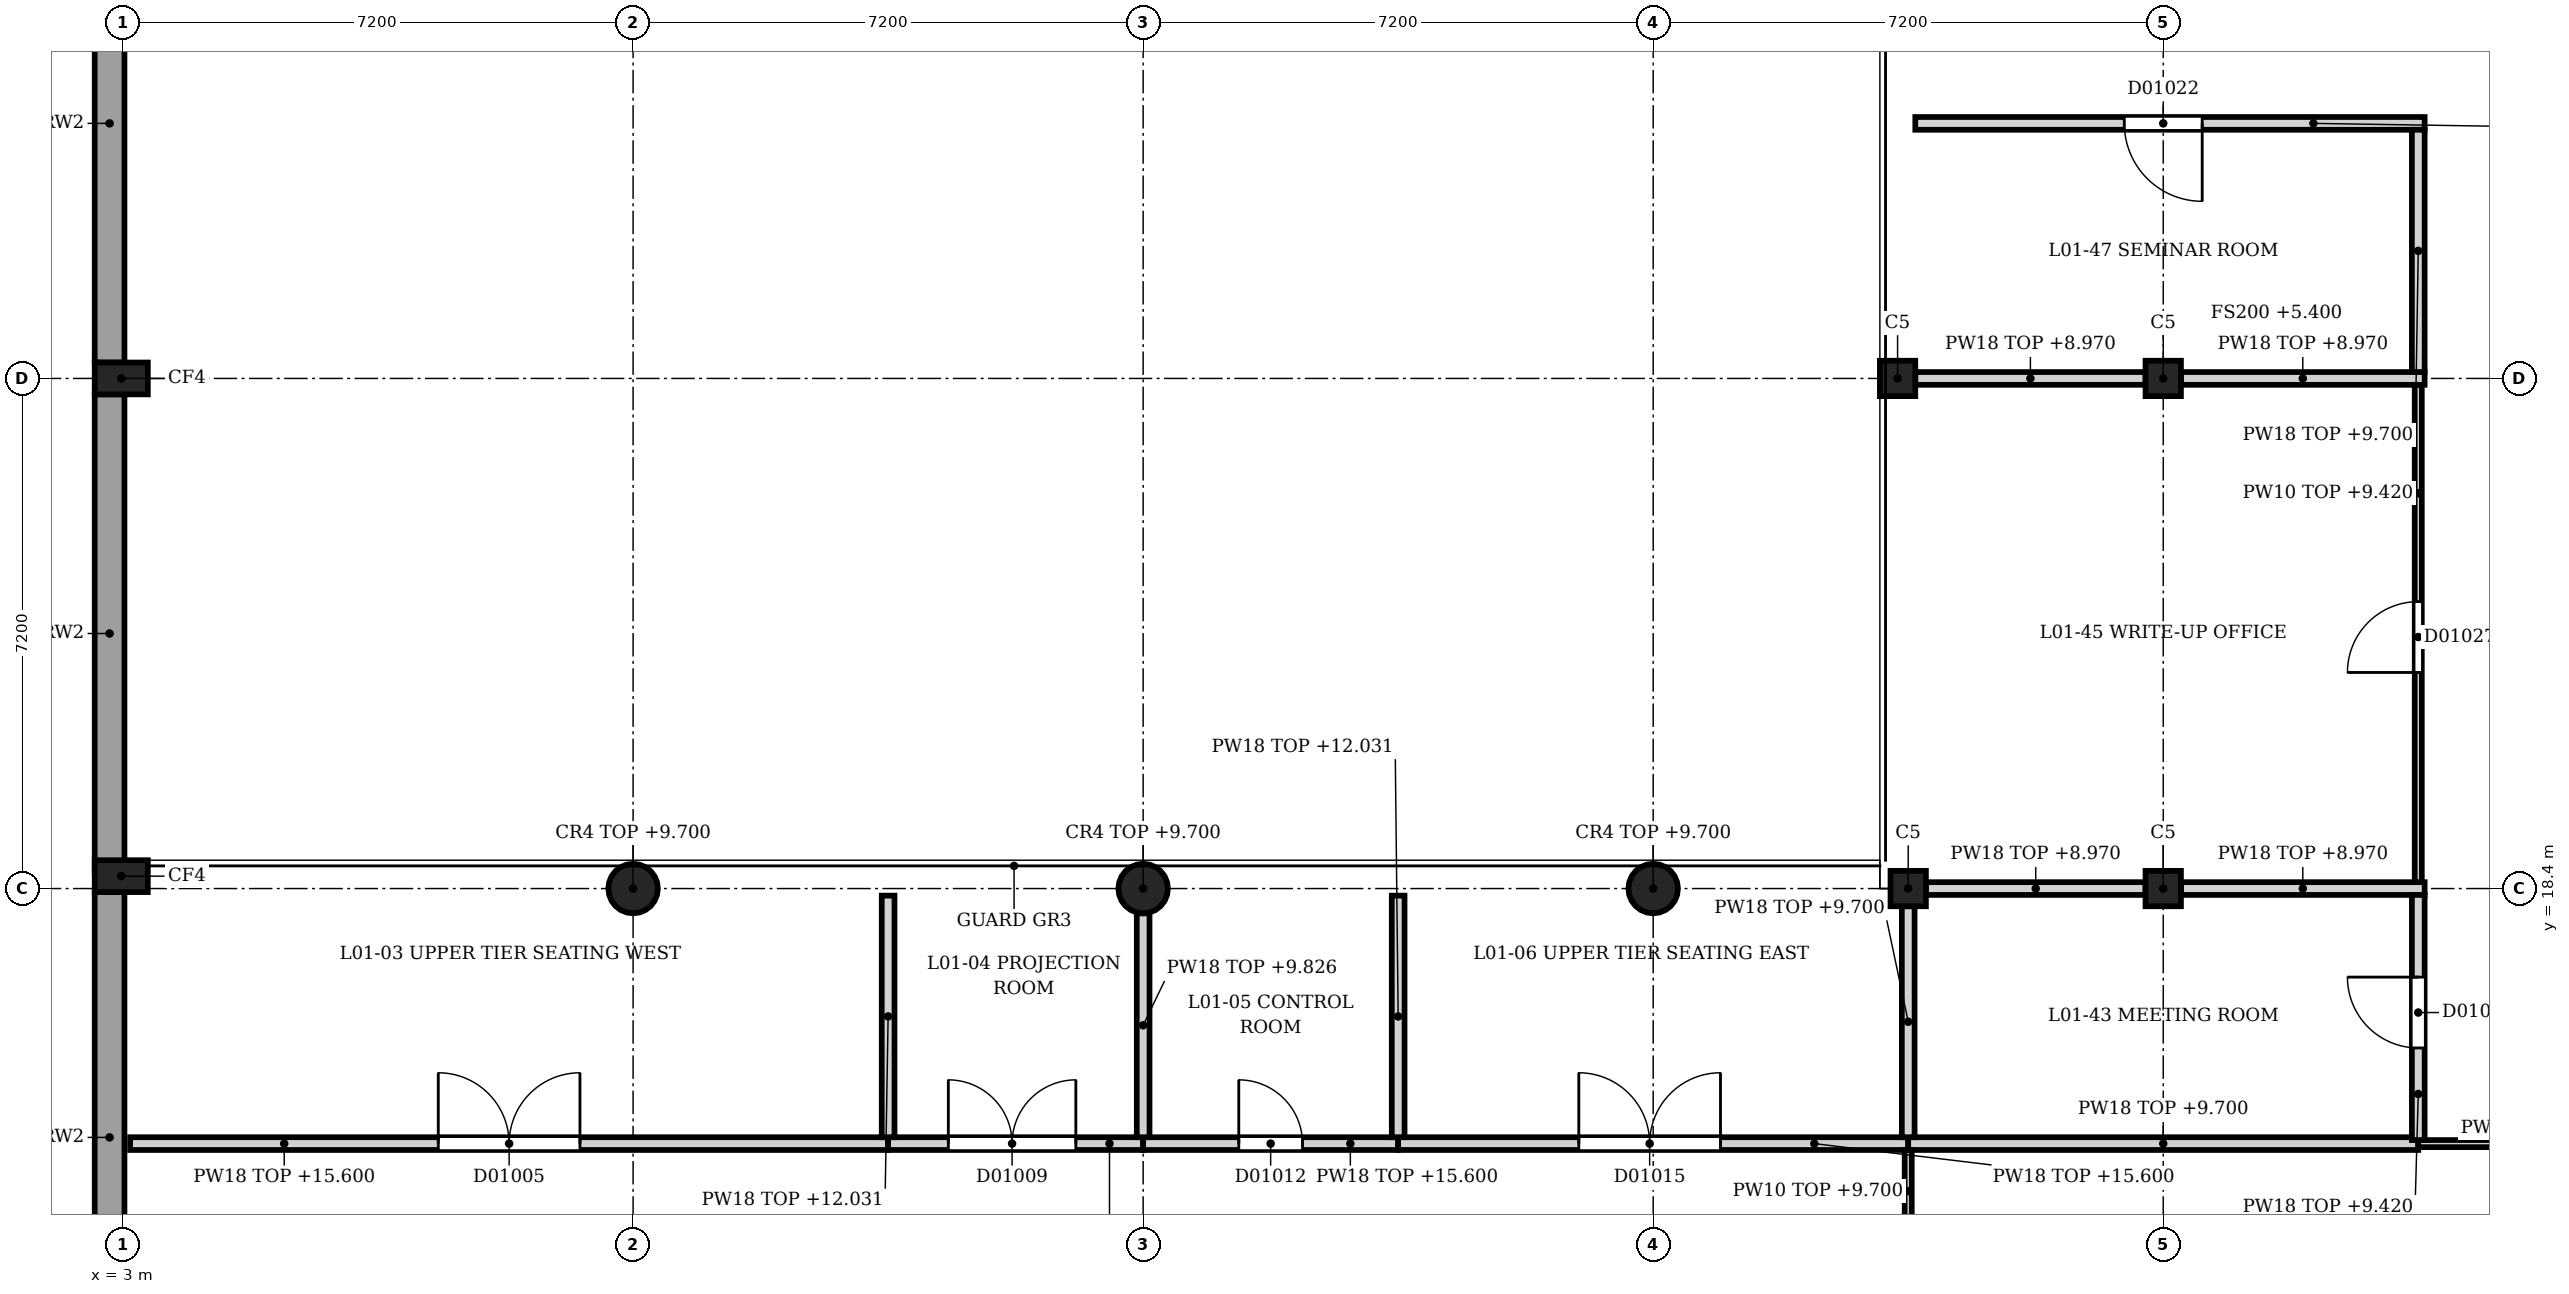
"""IFC4 building model, lengths in metres.
Left out: names, types, materials, properties, quantities, classifications, styles, units other than length and angle.
Written with IfcOpenShell. Run it as: python <this file> out.ifc"""

import sys

from ifc_helpers import new_model, si_unit, direction, frame, frame_2d, origin, origin_2d, place, context, subcontext, project, spatial, rectangle, circle, extrude, element, fill, save


model = new_model("IFC4")
c1 = context("Model", 3, precision=1e-05, world=origin(), true_north=direction((0.0, 1.0)))
c2 = subcontext(c1, "Body", "Model", "MODEL_VIEW")
j1 = project(units=[si_unit("LENGTHUNIT", "METRE"), si_unit("PLANEANGLEUNIT", "RADIAN")], contexts=[c1])
p1 = place(None, origin())
s1 = spatial("IfcSite", under=j1, at=p1, CompositionType="ELEMENT")
p2 = place(p1, origin())
s2 = spatial("IfcBuilding", under=s1, at=p2, CompositionType="ELEMENT")
p3 = place(p2, frame((0.0, 0.0, 5.4)))
s3 = spatial("IfcBuildingStorey", under=s2, at=p3, CompositionType="ELEMENT", Elevation=5.4)
for number, where, z_axis, x_axis in (
    (1, (28.2, 18.4, 0.0), (0.0, 0.0, 1.0), (1.0, 0.0, 0.0)),
    (2, (28.05, 25.6, 0.0), (0.0, 0.0, 1.0), (1.0, 0.0, 0.0)),
    (3, (31.8, 18.4, 0.0), (0.0, 0.0, 1.0), (1.0, 0.0, 0.0)),
    (4, (31.8, 25.6, 0.0), (0.0, 0.0, 1.0), (1.0, 0.0, 0.0)),
):
    element("IfcColumn", number, at=place(p3, frame(where, z_axis=z_axis, x_axis=x_axis)), inside=s3, PredefinedType="COLUMN", context=c2, shape_type="SweptSolid", body=[
        extrude(rectangle(XDim=0.5, YDim=0.5, at=origin_2d()), origin(), (0.0, 0.0, 1.0), 4.5),
    ])
p4 = place(p3, frame((2.975, 18.575, 0.0), z_axis=(0.0, 0.0, 1.0), x_axis=(1.0, 0.0, 0.0)))
e5 = element("IfcColumn", 5, at=p4, inside=s3, PredefinedType="COLUMN", context=c2, shape_type="SweptSolid", body=[
    extrude(rectangle(XDim=0.75, YDim=0.45, at=origin_2d()), origin(), (0.0, 0.0, 1.0), 4.5),
])
for number, where, z_axis, x_axis in (
    (6, (10.2, 18.4, 0.0), (0.0, 0.0, 1.0), (1.0, 0.0, 0.0)),
    (7, (17.4, 18.4, 0.0), (0.0, 0.0, 1.0), (1.0, 0.0, 0.0)),
    (8, (24.6, 18.4, 0.0), (0.0, 0.0, 1.0), (1.0, 0.0, 0.0)),
):
    element("IfcColumn", number, at=place(p3, frame(where, z_axis=z_axis, x_axis=x_axis)), inside=s3, PredefinedType="COLUMN", context=c2, shape_type="SweptSolid", body=[
        extrude(circle(Radius=0.35, at=origin_2d()), origin(), (0.0, 0.0, 1.0), 4.3),
    ])
p5 = place(p3, frame((2.975, 25.6, 0.0), z_axis=(0.0, 0.0, 1.0), x_axis=(1.0, 0.0, 0.0)))
e9 = element("IfcColumn", 9, at=p5, inside=s3, PredefinedType="COLUMN", context=c2, shape_type="SweptSolid", body=[
    extrude(rectangle(XDim=0.75, YDim=0.45, at=origin_2d()), origin(), (0.0, 0.0, 1.0), 4.5),
])
p6 = place(p3, frame((2.81, 11.425, 0.0), z_axis=(0.0, 0.0, 1.0), x_axis=(0.0, 1.0, 0.0)))
e10 = element("IfcWall", 10, at=p6, inside=s3, PredefinedType="SOLIDWALL", context=c2, shape_type="SweptSolid", body=[
    extrude(rectangle(XDim=6.925, YDim=0.42, at=frame_2d((3.462, 0.0))), origin(), (0.0, 0.0, 1.0), 4.5),
])
for number, where, z_axis, x_axis in (
    (11, (2.81, 18.625, 0.0), (0.0, 0.0, 1.0), (0.0, 1.0, 0.0)),
    (12, (2.81, 25.825, 0.0), (0.0, 0.0, 1.0), (0.0, 1.0, 0.0)),
):
    element("IfcWall", number, at=place(p3, frame(where, z_axis=z_axis, x_axis=x_axis)), inside=s3, PredefinedType="SOLIDWALL", context=c2, shape_type="SweptSolid", body=[
        extrude(rectangle(XDim=6.75, YDim=0.42, at=frame_2d((3.375, 0.0))), origin(), (0.0, 0.0, 1.0), 4.5),
    ])
p7 = place(p3, frame((13.8, 14.8, 0.0), z_axis=(0.0, 0.0, 1.0), x_axis=(-1.0, 0.0, 0.0)))
e13 = element("IfcWall", 13, at=p7, inside=s3, PredefinedType="PARTITIONING", context=c2, shape_type="SweptSolid", body=[
    extrude(rectangle(XDim=10.7, YDim=0.18, at=frame_2d((5.35, 0.0))), origin(), (0.0, 0.0, 1.0), 10.2),
])
p8 = place(p7, frame((4.35, 0.0, 0.0)))
e14 = element("IfcOpeningElement", 14, at=p8, cuts=e13, PredefinedType="OPENING", context=c2, shape_type="SweptSolid", body=[
    extrude(rectangle(XDim=2.0, YDim=2.3, at=frame_2d((1.0, 1.15))), frame((0.0, 0.1, 0.0), z_axis=(0.0, -1.0, 0.0), x_axis=(1.0, 0.0, 0.0)), (0.0, 0.0, 1.0), 0.2),
])
p9 = place(p3, frame((13.8, 14.8, 0.0), z_axis=(0.0, 0.0, 1.0), x_axis=(1.0, 0.0, 0.0)))
e15 = element("IfcWall", 15, at=p9, inside=s3, PredefinedType="PARTITIONING", context=c2, shape_type="SweptSolid", body=[
    extrude(rectangle(XDim=3.6, YDim=0.18, at=frame_2d((1.8, 0.0))), origin(), (0.0, 0.0, 1.0), 10.2),
])
p10 = place(p9, frame((0.85, 0.0, 0.0)))
e16 = element("IfcOpeningElement", 16, at=p10, cuts=e15, PredefinedType="OPENING", context=c2, shape_type="SweptSolid", body=[
    extrude(rectangle(XDim=1.8, YDim=2.2, at=frame_2d((0.9, 1.1))), frame((0.0, 0.1, 0.0), z_axis=(0.0, -1.0, 0.0), x_axis=(1.0, 0.0, 0.0)), (0.0, 0.0, 1.0), 0.2),
])
p11 = place(p3, frame((17.4, 14.8, 0.0), z_axis=(0.0, 0.0, 1.0), x_axis=(1.0, 0.0, 0.0)))
e17 = element("IfcWall", 17, at=p11, inside=s3, PredefinedType="PARTITIONING", context=c2, shape_type="SweptSolid", body=[
    extrude(rectangle(XDim=3.6, YDim=0.18, at=frame_2d((1.8, 0.0))), origin(), (0.0, 0.0, 1.0), 10.2),
])
p12 = place(p11, frame((1.35, 0.0, 0.0)))
e18 = element("IfcOpeningElement", 18, at=p12, cuts=e17, PredefinedType="OPENING", context=c2, shape_type="SweptSolid", body=[
    extrude(rectangle(XDim=0.9, YDim=2.2, at=frame_2d((0.45, 1.1))), frame((0.0, 0.1, 0.0), z_axis=(0.0, -1.0, 0.0), x_axis=(1.0, 0.0, 0.0)), (0.0, 0.0, 1.0), 0.2),
])
p13 = place(p3, frame((28.2, 14.8, 0.0), z_axis=(0.0, 0.0, 1.0), x_axis=(-1.0, 0.0, 0.0)))
e19 = element("IfcWall", 19, at=p13, inside=s3, PredefinedType="PARTITIONING", context=c2, shape_type="SweptSolid", body=[
    extrude(rectangle(XDim=7.2, YDim=0.18, at=frame_2d((3.6, 0.0))), origin(), (0.0, 0.0, 1.0), 10.2),
])
p14 = place(p13, frame((2.65, 0.0, 0.0)))
e20 = element("IfcOpeningElement", 20, at=p14, cuts=e19, PredefinedType="OPENING", context=c2, shape_type="SweptSolid", body=[
    extrude(rectangle(XDim=2.0, YDim=2.3, at=frame_2d((1.0, 1.15))), frame((0.0, 0.1, 0.0), z_axis=(0.0, -1.0, 0.0), x_axis=(1.0, 0.0, 0.0)), (0.0, 0.0, 1.0), 0.2),
])
p15 = place(p3, frame((28.2, 14.8, 0.0), z_axis=(0.0, 0.0, 1.0), x_axis=(1.0, 0.0, 0.0)))
e21 = element("IfcWall", 21, at=p15, inside=s3, PredefinedType="PARTITIONING", context=c2, shape_type="SweptSolid", body=[
    extrude(rectangle(XDim=7.2, YDim=0.18, at=frame_2d((3.6, 0.0))), origin(), (0.0, 0.0, 1.0), 4.3),
])
p16 = place(p3, frame((35.4, 14.8, 0.0), z_axis=(0.0, 0.0, 1.0), x_axis=(1.0, 0.0, 0.0)))
e22 = element("IfcWall", 22, at=p16, inside=s3, PredefinedType="PARTITIONING", context=c2, shape_type="SweptSolid", body=[
    extrude(rectangle(XDim=3.6, YDim=0.1, at=frame_2d((1.8, 0.0))), origin(), (0.0, 0.0, 1.0), 4.3),
])
p17 = place(p3, frame((28.45, 18.4, 0.0), z_axis=(0.0, 0.0, 1.0), x_axis=(1.0, 0.0, 0.0)))
e23 = element("IfcWall", 23, at=p17, inside=s3, PredefinedType="PARTITIONING", context=c2, shape_type="SweptSolid", body=[
    extrude(rectangle(XDim=3.1, YDim=0.18, at=frame_2d((1.55, 0.0))), origin(), (0.0, 0.0, 1.0), 3.57),
])
p18 = place(p3, frame((32.05, 18.4, 0.0), z_axis=(0.0, 0.0, 1.0), x_axis=(1.0, 0.0, 0.0)))
e24 = element("IfcWall", 24, at=p18, inside=s3, PredefinedType="PARTITIONING", context=c2, shape_type="SweptSolid", body=[
    extrude(rectangle(XDim=3.44, YDim=0.18, at=frame_2d((1.72, 0.0))), origin(), (0.0, 0.0, 1.0), 3.57),
])
p19 = place(p3, frame((28.3, 25.6, 0.0), z_axis=(0.0, 0.0, 1.0), x_axis=(1.0, 0.0, 0.0)))
e25 = element("IfcWall", 25, at=p19, inside=s3, PredefinedType="PARTITIONING", context=c2, shape_type="SweptSolid", body=[
    extrude(rectangle(XDim=3.25, YDim=0.18, at=frame_2d((1.625, 0.0))), origin(), (0.0, 0.0, 1.0), 3.57),
])
p20 = place(p3, frame((32.05, 25.6, 0.0), z_axis=(0.0, 0.0, 1.0), x_axis=(1.0, 0.0, 0.0)))
e26 = element("IfcWall", 26, at=p20, inside=s3, PredefinedType="PARTITIONING", context=c2, shape_type="SweptSolid", body=[
    extrude(rectangle(XDim=3.44, YDim=0.18, at=frame_2d((1.72, 0.0))), origin(), (0.0, 0.0, 1.0), 3.57),
])
p21 = place(p3, frame((35.49, 29.2, 0.0), z_axis=(0.0, 0.0, 1.0), x_axis=(-1.0, 0.0, 0.0)))
e27 = element("IfcWall", 27, at=p21, inside=s3, PredefinedType="PARTITIONING", context=c2, shape_type="SweptSolid", body=[
    extrude(rectangle(XDim=7.19, YDim=0.18, at=frame_2d((3.595, 0.0))), origin(), (0.0, 0.0, 1.0), 4.3),
])
p22 = place(p21, frame((3.14, 0.0, 0.0)))
e28 = element("IfcOpeningElement", 28, at=p22, cuts=e27, PredefinedType="OPENING", context=c2, shape_type="SweptSolid", body=[
    extrude(rectangle(XDim=1.1, YDim=2.3, at=frame_2d((0.55, 1.15))), frame((0.0, 0.1, 0.0), z_axis=(0.0, -1.0, 0.0), x_axis=(1.0, 0.0, 0.0)), (0.0, 0.0, 1.0), 0.2),
])
p23 = place(p3, frame((13.8, 14.89, 0.0), z_axis=(0.0, 0.0, 1.0), x_axis=(0.0, 1.0, 0.0)))
e29 = element("IfcWall", 29, at=p23, inside=s3, PredefinedType="PARTITIONING", context=c2, shape_type="SweptSolid", body=[
    extrude(rectangle(XDim=3.41, YDim=0.18, at=frame_2d((1.705, 0.0))), origin(), (0.0, 0.0, 1.0), 6.631),
])
p24 = place(p3, frame((17.4, 14.89, 0.0), z_axis=(0.0, 0.0, 1.0), x_axis=(0.0, 1.0, 0.0)))
e30 = element("IfcWall", 30, at=p24, inside=s3, PredefinedType="PARTITIONING", context=c2, shape_type="SweptSolid", body=[
    extrude(rectangle(XDim=3.16, YDim=0.18, at=frame_2d((1.58, 0.0))), origin(), (0.0, 0.0, 1.0), 4.426),
])
p25 = place(p3, frame((21.0, 14.89, 0.0), z_axis=(0.0, 0.0, 1.0), x_axis=(0.0, 1.0, 0.0)))
e31 = element("IfcWall", 31, at=p25, inside=s3, PredefinedType="PARTITIONING", context=c2, shape_type="SweptSolid", body=[
    extrude(rectangle(XDim=3.41, YDim=0.18, at=frame_2d((1.705, 0.0))), origin(), (0.0, 0.0, 1.0), 6.631),
])
p26 = place(p3, frame((28.2, 14.71, 0.0), z_axis=(0.0, 0.0, 1.0), x_axis=(0.0, -1.0, 0.0)))
e32 = element("IfcWall", 32, at=p26, inside=s3, PredefinedType="PARTITIONING", context=c2, shape_type="SweptSolid", body=[
    extrude(rectangle(XDim=3.26, YDim=0.1, at=frame_2d((1.63, 0.0))), origin(), (0.0, 0.0, 1.0), 4.3),
])
p27 = place(p26, frame((1.16, 0.0, 0.0)))
e33 = element("IfcOpeningElement", 33, at=p27, cuts=e32, PredefinedType="OPENING", context=c2, shape_type="SweptSolid", body=[
    extrude(rectangle(XDim=1.0, YDim=2.1, at=frame_2d((0.5, 1.05))), frame((0.0, 0.06, 0.0), z_axis=(0.0, -1.0, 0.0), x_axis=(1.0, 0.0, 0.0)), (0.0, 0.0, 1.0), 0.12),
])
p28 = place(p3, frame((28.2, 14.89, 0.0), z_axis=(0.0, 0.0, 1.0), x_axis=(0.0, 1.0, 0.0)))
e34 = element("IfcWall", 34, at=p28, inside=s3, PredefinedType="PARTITIONING", context=c2, shape_type="SweptSolid", body=[
    extrude(rectangle(XDim=3.26, YDim=0.18, at=frame_2d((1.63, 0.0))), origin(), (0.0, 0.0, 1.0), 4.3),
])
p29 = place(p3, frame((35.4, 14.85, 0.0), z_axis=(0.0, 0.0, 1.0), x_axis=(0.0, 1.0, 0.0)))
e35 = element("IfcWall", 35, at=p29, inside=s3, PredefinedType="PARTITIONING", context=c2, shape_type="SweptSolid", body=[
    extrude(rectangle(XDim=3.46, YDim=0.18, at=frame_2d((1.73, 0.0))), origin(), (0.0, 0.0, 1.0), 4.02),
])
p30 = place(p29, frame((1.3, 0.0, 0.0)))
e36 = element("IfcOpeningElement", 36, at=p30, cuts=e35, PredefinedType="OPENING", context=c2, shape_type="SweptSolid", body=[
    extrude(rectangle(XDim=1.0, YDim=2.1, at=frame_2d((0.5, 1.05))), frame((0.0, 0.1, 0.0), z_axis=(0.0, -1.0, 0.0), x_axis=(1.0, 0.0, 0.0)), (0.0, 0.0, 1.0), 0.2),
])
p31 = place(p3, frame((35.4, 18.49, 0.0), z_axis=(0.0, 0.0, 1.0), x_axis=(0.0, 1.0, 0.0)))
e37 = element("IfcWall", 37, at=p31, inside=s3, PredefinedType="PARTITIONING", context=c2, shape_type="SweptSolid", body=[
    extrude(rectangle(XDim=7.02, YDim=0.1, at=frame_2d((3.51, 0.0))), origin(), (0.0, 0.0, 1.0), 4.02),
])
p32 = place(p31, frame((2.96, 0.0, 0.0)))
e38 = element("IfcOpeningElement", 38, at=p32, cuts=e37, PredefinedType="OPENING", context=c2, shape_type="SweptSolid", body=[
    extrude(rectangle(XDim=1.0, YDim=2.1, at=frame_2d((0.5, 1.05))), frame((0.0, 0.06, 0.0), z_axis=(0.0, -1.0, 0.0), x_axis=(1.0, 0.0, 0.0)), (0.0, 0.0, 1.0), 0.12),
])
p33 = place(p3, frame((35.4, 25.69, 0.0), z_axis=(0.0, 0.0, 1.0), x_axis=(0.0, 1.0, 0.0)))
e39 = element("IfcWall", 39, at=p33, inside=s3, PredefinedType="PARTITIONING", context=c2, shape_type="SweptSolid", body=[
    extrude(rectangle(XDim=3.42, YDim=0.18, at=frame_2d((1.71, 0.0))), origin(), (0.0, 0.0, 1.0), 4.3),
])
p34 = place(p8, origin())
e40 = element("IfcDoor", 40, at=p34, inside=s3, OperationType="SINGLE_SWING_LEFT", PredefinedType="DOOR", context=c2, shape_type="SweptSolid", body=[
    extrude(rectangle(XDim=2.0, YDim=2.3, at=frame_2d((1.0, 1.15))), frame((0.0, 0.025, 0.0), z_axis=(0.0, -1.0, 0.0), x_axis=(1.0, 0.0, 0.0)), (0.0, 0.0, 1.0), 0.05),
])
fill(e14, e40)
p35 = place(p10, origin())
e41 = element("IfcDoor", 41, at=p35, inside=s3, OperationType="SINGLE_SWING_LEFT", PredefinedType="DOOR", context=c2, shape_type="SweptSolid", body=[
    extrude(rectangle(XDim=1.8, YDim=2.2, at=frame_2d((0.9, 1.1))), frame((0.0, 0.025, 0.0), z_axis=(0.0, -1.0, 0.0), x_axis=(1.0, 0.0, 0.0)), (0.0, 0.0, 1.0), 0.05),
])
fill(e16, e41)
p36 = place(p12, origin())
e42 = element("IfcDoor", 42, at=p36, inside=s3, OperationType="SINGLE_SWING_LEFT", PredefinedType="DOOR", context=c2, shape_type="SweptSolid", body=[
    extrude(rectangle(XDim=0.9, YDim=2.2, at=frame_2d((0.45, 1.1))), frame((0.0, 0.025, 0.0), z_axis=(0.0, -1.0, 0.0), x_axis=(1.0, 0.0, 0.0)), (0.0, 0.0, 1.0), 0.05),
])
fill(e18, e42)
p37 = place(p14, origin())
e43 = element("IfcDoor", 43, at=p37, inside=s3, OperationType="SINGLE_SWING_LEFT", PredefinedType="DOOR", context=c2, shape_type="SweptSolid", body=[
    extrude(rectangle(XDim=2.0, YDim=2.3, at=frame_2d((1.0, 1.15))), frame((0.0, 0.025, 0.0), z_axis=(0.0, -1.0, 0.0), x_axis=(1.0, 0.0, 0.0)), (0.0, 0.0, 1.0), 0.05),
])
fill(e20, e43)
p38 = place(p22, origin())
e44 = element("IfcDoor", 44, at=p38, inside=s3, OperationType="SINGLE_SWING_RIGHT", PredefinedType="DOOR", context=c2, shape_type="SweptSolid", body=[
    extrude(rectangle(XDim=1.1, YDim=2.3, at=frame_2d((0.55, 1.15))), frame((0.0, 0.025, 0.0), z_axis=(0.0, -1.0, 0.0), x_axis=(1.0, 0.0, 0.0)), (0.0, 0.0, 1.0), 0.05),
])
fill(e28, e44)
p39 = place(p30, origin())
e45 = element("IfcDoor", 45, at=p39, inside=s3, OperationType="SINGLE_SWING_RIGHT", PredefinedType="DOOR", context=c2, shape_type="SweptSolid", body=[
    extrude(rectangle(XDim=1.0, YDim=2.1, at=frame_2d((0.5, 1.05))), frame((0.0, 0.025, 0.0), z_axis=(0.0, -1.0, 0.0), x_axis=(1.0, 0.0, 0.0)), (0.0, 0.0, 1.0), 0.05),
])
fill(e36, e45)
p40 = place(p32, origin())
e46 = element("IfcDoor", 46, at=p40, inside=s3, OperationType="SINGLE_SWING_LEFT", PredefinedType="DOOR", context=c2, shape_type="SweptSolid", body=[
    extrude(rectangle(XDim=1.0, YDim=2.1, at=frame_2d((0.5, 1.05))), frame((0.0, 0.025, 0.0), z_axis=(0.0, -1.0, 0.0), x_axis=(1.0, 0.0, 0.0)), (0.0, 0.0, 1.0), 0.05),
])
fill(e38, e46)
save(model, sys.argv[1])
